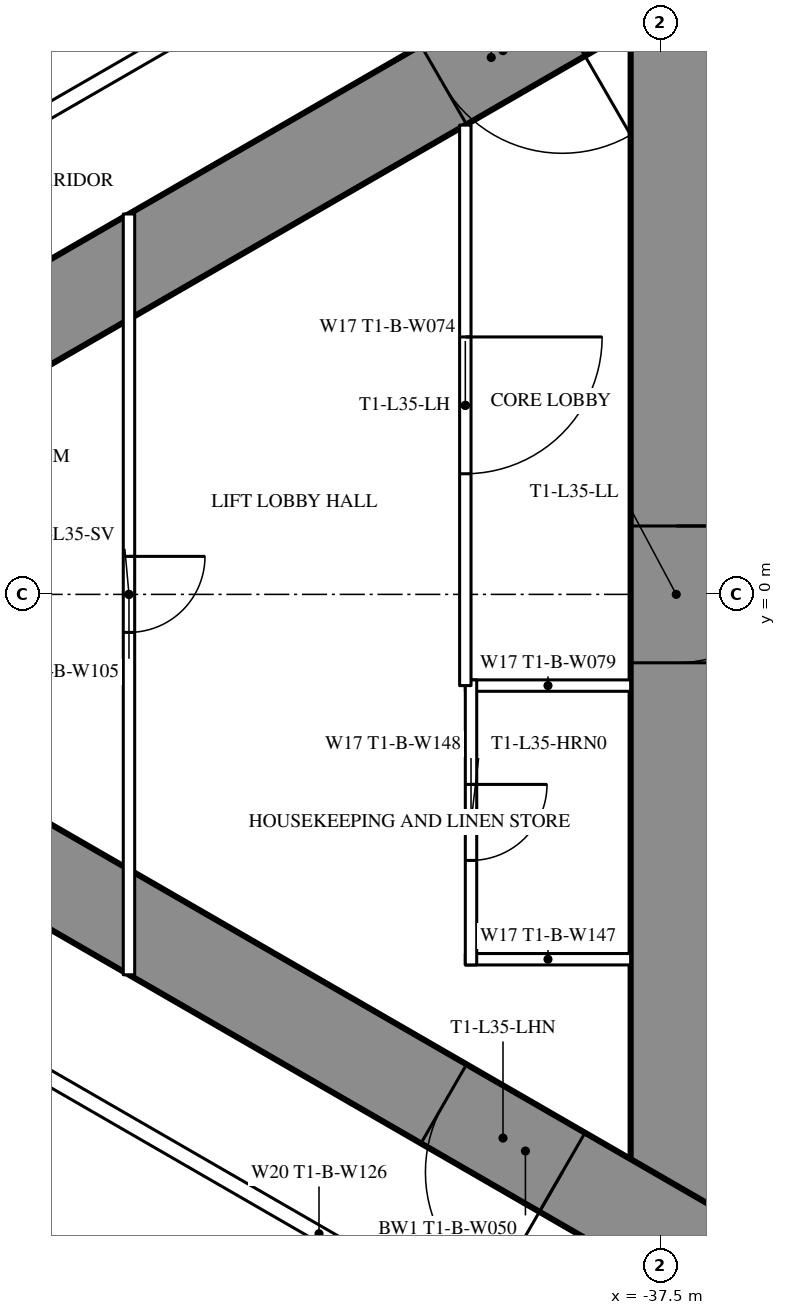
"""IFC4 building model, lengths in metres.
Left out: names, types, materials, properties, quantities, classifications, styles, units other than length and angle.
Written with IfcOpenShell. Run it as: python <this file> out.ifc"""

import sys

from ifc_helpers import new_model, si_unit, direction, frame, frame_2d, origin, place, context, subcontext, project, spatial, rectangle, extrude, element, fill, save


model = new_model("IFC4")
c1 = context("Model", 3, precision=1e-05, world=origin(), true_north=direction((0.0, 1.0)))
c2 = subcontext(c1, "Body", "Model", "MODEL_VIEW")
j1 = project(units=[si_unit("LENGTHUNIT", "METRE"), si_unit("PLANEANGLEUNIT", "RADIAN")], contexts=[c1])
p1 = place(None, origin())
s1 = spatial("IfcSite", under=j1, at=p1, CompositionType="ELEMENT")
p2 = place(p1, origin())
s2 = spatial("IfcBuilding", under=s1, at=p2, CompositionType="ELEMENT")
p3 = place(p2, frame((0.0, 0.0, 132.6)))
s3 = spatial("IfcBuildingStorey", under=s2, at=p3, CompositionType="ELEMENT", Elevation=132.6)
p4 = place(p3, frame((-37.3, 8.6, 0.0), z_axis=(0.0, 0.0, 1.0), x_axis=(0.0, -1.0, 0.0)))
e1 = element("IfcWall", 1, at=p4, inside=s3, PredefinedType="SHEAR", context=c2, shape_type="SweptSolid", body=[
    extrude(rectangle(XDim=17.2, YDim=1.2, at=frame_2d((8.6, 0.0))), origin(), (0.0, 0.0, 1.0), 3.5),
])
p5 = place(p4, frame((7.7, 0.0, 0.0)))
e2 = element("IfcOpeningElement", 2, at=p5, cuts=e1, PredefinedType="OPENING", context=c2, shape_type="SweptSolid", body=[
    extrude(rectangle(XDim=1.8, YDim=2.2, at=frame_2d((0.9, 1.1))), frame((0.0, 0.61, 0.0), z_axis=(0.0, -1.0, 0.0), x_axis=(1.0, 0.0, 0.0)), (0.0, 0.0, 1.0), 1.22),
])
p6 = place(p3, frame((-27.2, 14.3, 0.0), z_axis=(0.0, 0.0, 1.0), x_axis=(-0.866026593062, -0.499997940104, 0.0)))
e3 = element("IfcWall", 3, at=p6, inside=s3, PredefinedType="SHEAR", context=c2, shape_type="SweptSolid", body=[
    extrude(rectangle(XDim=28.946, YDim=1.2, at=frame_2d((14.473, 0.0))), origin(), (0.0, 0.0, 1.0), 3.5),
])
p7 = place(p6, frame((4.6, 0.0, 0.0)))
e4 = element("IfcOpeningElement", 4, at=p7, cuts=e3, PredefinedType="OPENING", context=c2, shape_type="SweptSolid", body=[
    extrude(rectangle(XDim=1.0, YDim=2.2, at=frame_2d((0.5, 1.1))), frame((0.0, 0.61, 0.0), z_axis=(0.0, -1.0, 0.0), x_axis=(1.0, 0.0, 0.0)), (0.0, 0.0, 1.0), 1.22),
])
p8 = place(p6, frame((13.395, 0.0, 0.0)))
e5 = element("IfcOpeningElement", 5, at=p8, cuts=e3, PredefinedType="OPENING", context=c2, shape_type="SweptSolid", body=[
    extrude(rectangle(XDim=1.8, YDim=2.2, at=frame_2d((0.9, 1.1))), frame((0.0, 0.61, 0.0), z_axis=(0.0, -1.0, 0.0), x_axis=(1.0, 0.0, 0.0)), (0.0, 0.0, 1.0), 1.22),
])
p9 = place(p3, frame((-27.2, -14.3, 0.0), z_axis=(0.0, 0.0, 1.0), x_axis=(-0.866024021859, 0.500002393557, 0.0)))
e6 = element("IfcWall", 6, at=p9, inside=s3, PredefinedType="SHEAR", context=c2, shape_type="SweptSolid", body=[
    extrude(rectangle(XDim=27.907, YDim=1.2, at=frame_2d((13.954, 0.0))), origin(), (0.0, 0.0, 1.0), 3.5),
])
p10 = place(p9, frame((4.6, 0.0, 0.0)))
e7 = element("IfcOpeningElement", 7, at=p10, cuts=e6, PredefinedType="OPENING", context=c2, shape_type="SweptSolid", body=[
    extrude(rectangle(XDim=1.0, YDim=2.2, at=frame_2d((0.5, 1.1))), frame((0.0, 0.61, 0.0), z_axis=(0.0, -1.0, 0.0), x_axis=(1.0, 0.0, 0.0)), (0.0, 0.0, 1.0), 1.22),
])
p11 = place(p9, frame((13.395, 0.0, 0.0)))
e8 = element("IfcOpeningElement", 8, at=p11, cuts=e6, PredefinedType="OPENING", context=c2, shape_type="SweptSolid", body=[
    extrude(rectangle(XDim=1.8, YDim=2.2, at=frame_2d((0.9, 1.1))), frame((0.0, 0.61, 0.0), z_axis=(0.0, -1.0, 0.0), x_axis=(1.0, 0.0, 0.0)), (0.0, 0.0, 1.0), 1.22),
])
p12 = place(p3, frame((-37.7, 10.894, 0.0), z_axis=(0.0, 0.0, 1.0), x_axis=(-0.866027905338, -0.499995667157, 0.0)))
e9 = element("IfcWall", 9, at=p12, inside=s3, PredefinedType="PARTITIONING", context=c2, shape_type="SweptSolid", body=[
    extrude(rectangle(XDim=21.787, YDim=0.2, at=frame_2d((10.894, 0.0))), origin(), (0.0, 0.0, 1.0), 3.25),
])
p13 = place(p12, frame((17.711, 0.0, 0.0)))
e10 = element("IfcOpeningElement", 10, at=p13, cuts=e9, PredefinedType="OPENING", context=c2, shape_type="SweptSolid", body=[
    extrude(rectangle(XDim=0.95, YDim=2.2, at=frame_2d((0.475, 1.1))), frame((0.0, 0.11, 0.0), z_axis=(0.0, -1.0, 0.0), x_axis=(1.0, 0.0, 0.0)), (0.0, 0.0, 1.0), 0.22),
])
p14 = place(p12, frame((19.399, 0.0, 0.0)))
e11 = element("IfcOpeningElement", 11, at=p14, cuts=e9, PredefinedType="OPENING", context=c2, shape_type="SweptSolid", body=[
    extrude(rectangle(XDim=1.8, YDim=2.2, at=frame_2d((0.9, 1.1))), frame((0.0, 0.11, 0.0), z_axis=(0.0, -1.0, 0.0), x_axis=(1.0, 0.0, 0.0)), (0.0, 0.0, 1.0), 0.22),
])
p15 = place(p12, frame((0.6, 0.0, 0.0)))
e12 = element("IfcOpeningElement", 12, at=p15, cuts=e9, PredefinedType="OPENING", context=c2, shape_type="SweptSolid", body=[
    extrude(rectangle(XDim=0.95, YDim=2.2, at=frame_2d((0.475, 1.1))), frame((0.0, 0.11, 0.0), z_axis=(0.0, -1.0, 0.0), x_axis=(1.0, 0.0, 0.0)), (0.0, 0.0, 1.0), 0.22),
])
p16 = place(p3, frame((-36.92, -11.344, 0.0), z_axis=(0.0, 0.0, 1.0), x_axis=(-0.866027897759, 0.499995680284, 0.0)))
e13 = element("IfcWall", 13, at=p16, inside=s3, PredefinedType="PARTITIONING", context=c2, shape_type="SweptSolid", body=[
    extrude(rectangle(XDim=11.731, YDim=0.2, at=frame_2d((5.865, 0.0))), origin(), (0.0, 0.0, 1.0), 3.25),
])
p17 = place(p16, frame((3.35, 0.0, 0.0)))
e14 = element("IfcOpeningElement", 14, at=p17, cuts=e13, PredefinedType="OPENING", context=c2, shape_type="SweptSolid", body=[
    extrude(rectangle(XDim=1.0, YDim=2.2, at=frame_2d((0.5, 1.1))), frame((0.0, 0.11, 0.0), z_axis=(0.0, -1.0, 0.0), x_axis=(1.0, 0.0, 0.0)), (0.0, 0.0, 1.0), 0.22),
])
for number, where, z_axis, x_axis in (
    (15, (-37.9, -1.2, 0.0), (0.0, 0.0, 1.0), (-1.0, 0.0, 0.0)),
    (16, (-37.9, -4.8, 0.0), (0.0, 0.0, 1.0), (-1.0, 0.0, 0.0)),
):
    element("IfcWall", number, at=place(p3, frame(where, z_axis=z_axis, x_axis=x_axis)), inside=s3, PredefinedType="PARTITIONING", context=c2, shape_type="SweptSolid", body=[
        extrude(rectangle(XDim=2.175, YDim=0.15, at=frame_2d((1.087, 0.0))), origin(), (0.0, 0.0, 1.0), 3.25),
    ])
p18 = place(p3, frame((-40.0, -1.125, 0.0), z_axis=(0.0, 0.0, 1.0), x_axis=(0.0, -1.0, 0.0)))
e17 = element("IfcWall", 17, at=p18, inside=s3, PredefinedType="PARTITIONING", context=c2, shape_type="SweptSolid", body=[
    extrude(rectangle(XDim=3.75, YDim=0.15, at=frame_2d((1.875, 0.0))), origin(), (0.0, 0.0, 1.0), 3.25),
])
p19 = place(p18, frame((1.375, 0.0, 0.0)))
e18 = element("IfcOpeningElement", 18, at=p19, cuts=e17, PredefinedType="OPENING", context=c2, shape_type="SweptSolid", body=[
    extrude(rectangle(XDim=1.0, YDim=2.2, at=frame_2d((0.5, 1.1))), frame((0.0, 0.085, 0.0), z_axis=(0.0, -1.0, 0.0), x_axis=(1.0, 0.0, 0.0)), (0.0, 0.0, 1.0), 0.17),
])
p20 = place(p3, frame((-40.075, 6.174, 0.0), z_axis=(0.0, 0.0, 1.0), x_axis=(0.0, -1.0, 0.0)))
e19 = element("IfcWall", 19, at=p20, inside=s3, PredefinedType="PARTITIONING", context=c2, shape_type="SweptSolid", body=[
    extrude(rectangle(XDim=7.374, YDim=0.15, at=frame_2d((3.687, 0.0))), origin(), (0.0, 0.0, 1.0), 3.25),
])
p21 = place(p20, frame((2.787, 0.0, 0.0)))
e20 = element("IfcOpeningElement", 20, at=p21, cuts=e19, PredefinedType="OPENING", context=c2, shape_type="SweptSolid", body=[
    extrude(rectangle(XDim=1.8, YDim=2.2, at=frame_2d((0.9, 1.1))), frame((0.0, 0.085, 0.0), z_axis=(0.0, -1.0, 0.0), x_axis=(1.0, 0.0, 0.0)), (0.0, 0.0, 1.0), 0.17),
])
p22 = place(p3, frame((-44.5, 5.005, 0.0), z_axis=(0.0, 0.0, 1.0), x_axis=(0.0, -1.0, 0.0)))
e21 = element("IfcWall", 21, at=p22, inside=s3, PredefinedType="PARTITIONING", context=c2, shape_type="SweptSolid", body=[
    extrude(rectangle(XDim=10.009, YDim=0.15, at=frame_2d((5.005, 0.0))), origin(), (0.0, 0.0, 1.0), 2.45),
])
p23 = place(p22, frame((4.505, 0.0, 0.0)))
e22 = element("IfcOpeningElement", 22, at=p23, cuts=e21, PredefinedType="OPENING", context=c2, shape_type="SweptSolid", body=[
    extrude(rectangle(XDim=1.0, YDim=2.2, at=frame_2d((0.5, 1.1))), frame((0.0, 0.085, 0.0), z_axis=(0.0, -1.0, 0.0), x_axis=(1.0, 0.0, 0.0)), (0.0, 0.0, 1.0), 0.17),
])
p24 = place(p19, origin())
e23 = element("IfcDoor", 23, at=p24, inside=s3, OperationType="SINGLE_SWING_LEFT", PredefinedType="DOOR", context=c2, shape_type="SweptSolid", body=[
    extrude(rectangle(XDim=1.0, YDim=2.2, at=frame_2d((0.5, 1.1))), frame((0.0, 0.025, 0.0), z_axis=(0.0, -1.0, 0.0), x_axis=(1.0, 0.0, 0.0)), (0.0, 0.0, 1.0), 0.05),
])
fill(e18, e23)
p25 = place(p21, origin())
e24 = element("IfcDoor", 24, at=p25, inside=s3, OperationType="DOUBLE_DOOR_SINGLE_SWING", PredefinedType="DOOR", context=c2, shape_type="SweptSolid", body=[
    extrude(rectangle(XDim=1.8, YDim=2.2, at=frame_2d((0.9, 1.1))), frame((0.0, 0.025, 0.0), z_axis=(0.0, -1.0, 0.0), x_axis=(1.0, 0.0, 0.0)), (0.0, 0.0, 1.0), 0.05),
])
fill(e20, e24)
p26 = place(p23, origin())
e25 = element("IfcDoor", 25, at=p26, inside=s3, OperationType="SINGLE_SWING_LEFT", PredefinedType="DOOR", context=c2, shape_type="SweptSolid", body=[
    extrude(rectangle(XDim=1.0, YDim=2.2, at=frame_2d((0.5, 1.1))), frame((0.0, 0.025, 0.0), z_axis=(0.0, -1.0, 0.0), x_axis=(1.0, 0.0, 0.0)), (0.0, 0.0, 1.0), 0.05),
])
fill(e22, e25)
p27 = place(p8, origin())
e26 = element("IfcDoor", 26, at=p27, inside=s3, OperationType="DOUBLE_DOOR_SINGLE_SWING", PredefinedType="DOOR", context=c2, shape_type="SweptSolid", body=[
    extrude(rectangle(XDim=1.8, YDim=2.2, at=frame_2d((0.9, 1.1))), frame((0.0, 0.025, 0.0), z_axis=(0.0, -1.0, 0.0), x_axis=(1.0, 0.0, 0.0)), (0.0, 0.0, 1.0), 0.05),
])
fill(e5, e26)
p28 = place(p11, origin())
e27 = element("IfcDoor", 27, at=p28, inside=s3, OperationType="DOUBLE_DOOR_SINGLE_SWING", PredefinedType="DOOR", context=c2, shape_type="SweptSolid", body=[
    extrude(rectangle(XDim=1.8, YDim=2.2, at=frame_2d((0.9, 1.1))), frame((0.0, 0.025, 0.0), z_axis=(0.0, -1.0, 0.0), x_axis=(1.0, 0.0, 0.0)), (0.0, 0.0, 1.0), 0.05),
])
fill(e8, e27)
p29 = place(p5, origin())
e28 = element("IfcDoor", 28, at=p29, inside=s3, OperationType="DOUBLE_DOOR_SINGLE_SWING", PredefinedType="DOOR", context=c2, shape_type="SweptSolid", body=[
    extrude(rectangle(XDim=1.8, YDim=2.2, at=frame_2d((0.9, 1.1))), frame((0.0, 0.025, 0.0), z_axis=(0.0, -1.0, 0.0), x_axis=(1.0, 0.0, 0.0)), (0.0, 0.0, 1.0), 0.05),
])
fill(e2, e28)
save(model, sys.argv[1])
